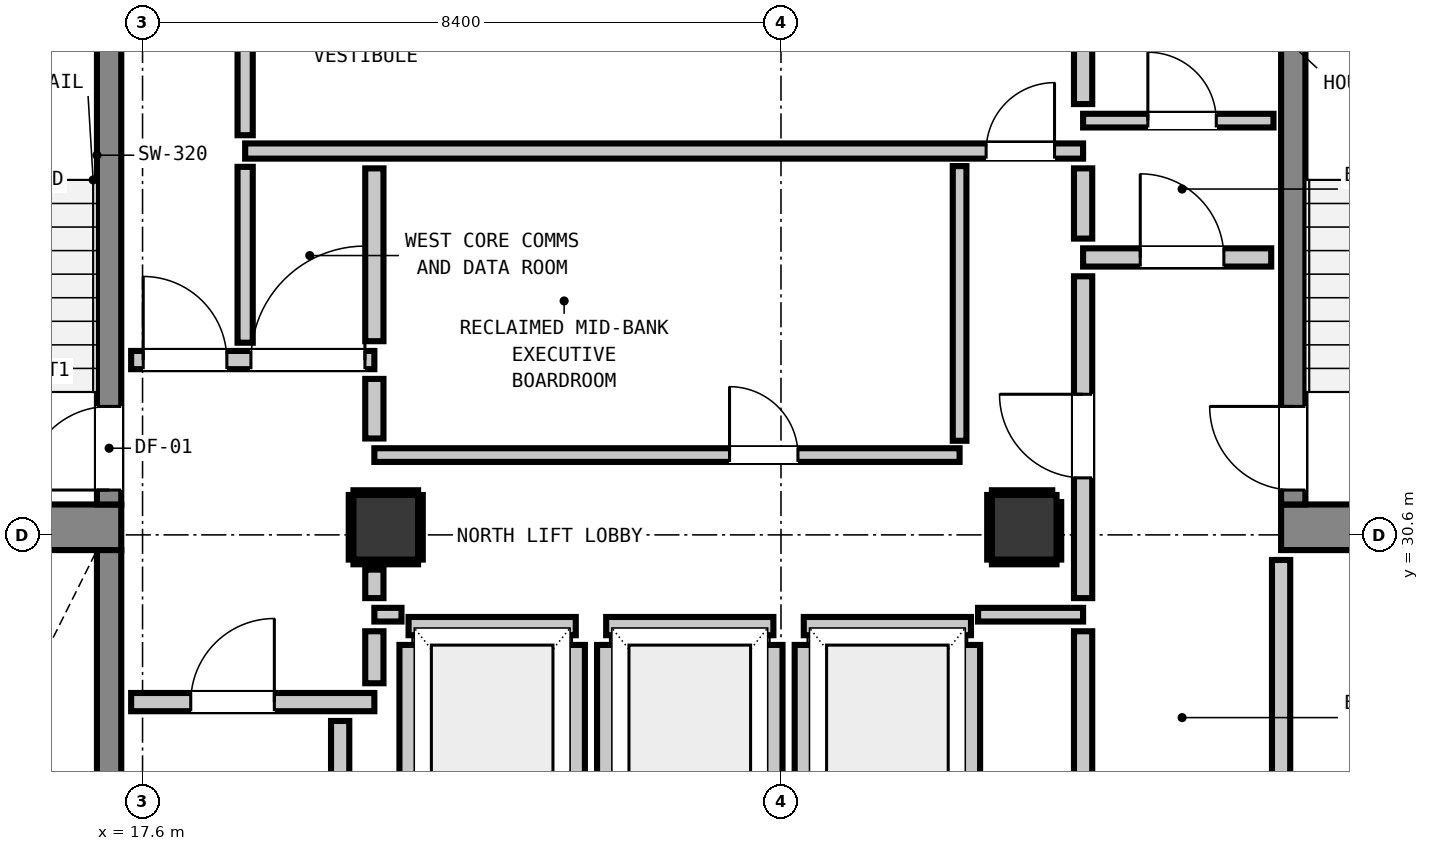
"""IFC4 building model, lengths in metres.
Left out: names, types, materials, properties, quantities, classifications, styles, units other than length and angle.
Written with IfcOpenShell. Run it as: python <this file> out.ifc"""

import sys

from ifc_helpers import new_model, si_unit, direction, frame, frame_2d, origin, origin_2d, place, context, subcontext, project, spatial, rectangle, extrude, element, fill, save


model = new_model("IFC4")
c1 = context("Model", 3, precision=1e-05, world=origin(), true_north=direction((0.0, 1.0)))
c2 = subcontext(c1, "Body", "Model", "MODEL_VIEW")
j1 = project(units=[si_unit("LENGTHUNIT", "METRE"), si_unit("PLANEANGLEUNIT", "RADIAN")], contexts=[c1])
p1 = place(None, origin())
s1 = spatial("IfcSite", under=j1, at=p1, CompositionType="ELEMENT")
p2 = place(p1, origin())
s2 = spatial("IfcBuilding", under=s1, at=p2, CompositionType="ELEMENT")
p3 = place(p2, frame((0.0, 0.0, 193.48)))
s3 = spatial("IfcBuildingStorey", under=s2, at=p3, CompositionType="ELEMENT", Elevation=193.48)
for number, where, z_axis, x_axis in (
    (1, (13.78, 30.7, 0.0), (0.0, 0.0, 1.0), (1.0, 0.0, 0.0)),
    (2, (32.58, 30.7, 0.0), (0.0, 0.0, 1.0), (1.0, 0.0, 0.0)),
):
    element("IfcWall", number, at=place(p3, frame(where, z_axis=z_axis, x_axis=x_axis)), inside=s3, PredefinedType="SHEAR", context=c2, shape_type="SweptSolid", body=[
        extrude(rectangle(XDim=3.54, YDim=0.6, at=frame_2d((1.77, 0.0))), origin(), (0.0, 0.0, 1.0), 3.32),
    ])
p4 = place(p3, frame((17.16, 31.0, 0.0), z_axis=(0.0, 0.0, 1.0), x_axis=(0.0, 1.0, 0.0)))
e3 = element("IfcWall", 3, at=p4, inside=s3, PredefinedType="SHEAR", context=c2, shape_type="SweptSolid", body=[
    extrude(rectangle(XDim=7.8, YDim=0.32, at=frame_2d((3.9, 0.0))), origin(), (0.0, 0.0, 1.0), 3.32),
])
p5 = place(p4, frame((0.19, 0.0, 0.0)))
e4 = element("IfcOpeningElement", 4, at=p5, cuts=e3, PredefinedType="OPENING", context=c2, shape_type="SweptSolid", body=[
    extrude(rectangle(XDim=1.1, YDim=2.15, at=frame_2d((0.55, 1.075))), frame((0.0, 0.17, 0.0), z_axis=(0.0, -1.0, 0.0), x_axis=(1.0, 0.0, 0.0)), (0.0, 0.0, 1.0), 0.34),
])
p6 = place(p3, frame((17.16, 22.4, 0.0), z_axis=(0.0, 0.0, 1.0), x_axis=(0.0, 1.0, 0.0)))
e5 = element("IfcWall", 5, at=p6, inside=s3, PredefinedType="SHEAR", context=c2, shape_type="SweptSolid", body=[
    extrude(rectangle(XDim=8.0, YDim=0.32, at=frame_2d((4.0, 0.0))), origin(), (0.0, 0.0, 1.0), 3.32),
])
p7 = place(p6, frame((0.39, 0.0, 0.0)))
e6 = element("IfcOpeningElement", 6, at=p7, cuts=e5, PredefinedType="OPENING", context=c2, shape_type="SweptSolid", body=[
    extrude(rectangle(XDim=1.1, YDim=2.15, at=frame_2d((0.55, 1.075))), frame((0.0, 0.17, 0.0), z_axis=(0.0, -1.0, 0.0), x_axis=(1.0, 0.0, 0.0)), (0.0, 0.0, 1.0), 0.34),
])
p8 = place(p3, frame((32.74, 31.0, 0.0), z_axis=(0.0, 0.0, 1.0), x_axis=(0.0, 1.0, 0.0)))
e7 = element("IfcWall", 7, at=p8, inside=s3, PredefinedType="SHEAR", context=c2, shape_type="SweptSolid", body=[
    extrude(rectangle(XDim=7.8, YDim=0.32, at=frame_2d((3.9, 0.0))), origin(), (0.0, 0.0, 1.0), 3.32),
])
p9 = place(p8, frame((0.19, 0.0, 0.0)))
e8 = element("IfcOpeningElement", 8, at=p9, cuts=e7, PredefinedType="OPENING", context=c2, shape_type="SweptSolid", body=[
    extrude(rectangle(XDim=1.1, YDim=2.15, at=frame_2d((0.55, 1.075))), frame((0.0, 0.17, 0.0), z_axis=(0.0, -1.0, 0.0), x_axis=(1.0, 0.0, 0.0)), (0.0, 0.0, 1.0), 0.34),
])
for number, where, z_axis, x_axis in (
    (9, (20.8, 30.7, 0.0), (0.0, 0.0, 1.0), (1.0, 0.0, 0.0)),
    (10, (29.2, 30.7, 0.0), (0.0, 0.0, 1.0), (1.0, 0.0, 0.0)),
):
    element("IfcColumn", number, at=place(p3, frame(where, z_axis=z_axis, x_axis=x_axis)), inside=s3, PredefinedType="COLUMN", context=c2, shape_type="SweptSolid", body=[
        extrude(rectangle(XDim=0.85, YDim=0.85, at=origin_2d()), origin(), (0.0, 0.0, 1.0), 3.32),
    ])
p10 = place(p3, frame((21.1, 29.4, 0.0), z_axis=(0.0, 0.0, 1.0), x_axis=(1.0, 0.0, 0.0)))
e11 = element("IfcWall", 11, at=p10, inside=s3, PredefinedType="PARTITIONING", context=c2, shape_type="SweptSolid", body=[
    extrude(rectangle(XDim=2.2, YDim=0.24, at=frame_2d((1.1, 0.0))), origin(), (0.0, 0.0, 1.0), 3.1),
])
p11 = place(p3, frame((21.1, 27.048, 0.0), z_axis=(0.0, 0.0, 1.0), x_axis=(0.0, 1.0, 0.0)))
e12 = element("IfcWall", 12, at=p11, inside=s3, PredefinedType="PARTITIONING", context=c2, shape_type="SweptSolid", body=[
    extrude(rectangle(XDim=2.104, YDim=0.24, at=frame_2d((1.052, 0.0))), origin(), (0.0, 0.0, 1.0), 2.335),
])
p12 = place(p3, frame((23.3, 27.048, 0.0), z_axis=(0.0, 0.0, 1.0), x_axis=(0.0, 1.0, 0.0)))
e13 = element("IfcWall", 13, at=p12, inside=s3, PredefinedType="PARTITIONING", context=c2, shape_type="SweptSolid", body=[
    extrude(rectangle(XDim=2.104, YDim=0.24, at=frame_2d((1.052, 0.0))), origin(), (0.0, 0.0, 1.0), 3.1),
])
p13 = place(p3, frame((23.7, 29.4, 0.0), z_axis=(0.0, 0.0, 1.0), x_axis=(1.0, 0.0, 0.0)))
e14 = element("IfcWall", 14, at=p13, inside=s3, PredefinedType="PARTITIONING", context=c2, shape_type="SweptSolid", body=[
    extrude(rectangle(XDim=2.2, YDim=0.24, at=frame_2d((1.1, 0.0))), origin(), (0.0, 0.0, 1.0), 3.1),
])
for number, where, z_axis, x_axis in (
    (15, (23.7, 27.048, 0.0), (0.0, 0.0, 1.0), (0.0, 1.0, 0.0)),
    (16, (25.9, 27.048, 0.0), (0.0, 0.0, 1.0), (0.0, 1.0, 0.0)),
):
    element("IfcWall", number, at=place(p3, frame(where, z_axis=z_axis, x_axis=x_axis)), inside=s3, PredefinedType="PARTITIONING", context=c2, shape_type="SweptSolid", body=[
        extrude(rectangle(XDim=2.104, YDim=0.24, at=frame_2d((1.052, 0.0))), origin(), (0.0, 0.0, 1.0), 3.1),
    ])
p14 = place(p3, frame((26.3, 29.4, 0.0), z_axis=(0.0, 0.0, 1.0), x_axis=(1.0, 0.0, 0.0)))
e17 = element("IfcWall", 17, at=p14, inside=s3, PredefinedType="PARTITIONING", context=c2, shape_type="SweptSolid", body=[
    extrude(rectangle(XDim=2.2, YDim=0.24, at=frame_2d((1.1, 0.0))), origin(), (0.0, 0.0, 1.0), 3.1),
])
p15 = place(p3, frame((26.3, 27.048, 0.0), z_axis=(0.0, 0.0, 1.0), x_axis=(0.0, 1.0, 0.0)))
e18 = element("IfcWall", 18, at=p15, inside=s3, PredefinedType="PARTITIONING", context=c2, shape_type="SweptSolid", body=[
    extrude(rectangle(XDim=2.104, YDim=0.24, at=frame_2d((1.052, 0.0))), origin(), (0.0, 0.0, 1.0), 3.1),
])
p16 = place(p3, frame((28.5, 27.33, 0.0), z_axis=(0.0, 0.0, 1.0), x_axis=(0.0, 1.0, 0.0)))
e19 = element("IfcWall", 19, at=p16, inside=s3, PredefinedType="PARTITIONING", context=c2, shape_type="SweptSolid", body=[
    extrude(rectangle(XDim=1.822, YDim=0.24, at=frame_2d((0.911, 0.0))), origin(), (0.0, 0.0, 1.0), 3.1),
])
p17 = place(p3, frame((17.45, 28.4, 0.0), z_axis=(0.0, 0.0, 1.0), x_axis=(1.0, 0.0, 0.0)))
e20 = element("IfcWall", 20, at=p17, inside=s3, PredefinedType="PARTITIONING", context=c2, shape_type="SweptSolid", body=[
    extrude(rectangle(XDim=3.2, YDim=0.24, at=frame_2d((1.6, 0.0))), origin(), (0.0, 0.0, 1.0), 3.1),
])
p18 = place(p17, frame((0.784, 0.0, 0.0)))
e21 = element("IfcOpeningElement", 21, at=p18, cuts=e20, PredefinedType="OPENING", context=c2, shape_type="SweptSolid", body=[
    extrude(rectangle(XDim=1.1, YDim=2.15, at=frame_2d((0.55, 1.075))), frame((0.0, 0.13, 0.0), z_axis=(0.0, -1.0, 0.0), x_axis=(1.0, 0.0, 0.0)), (0.0, 0.0, 1.0), 0.26),
])
p19 = place(p3, frame((17.45, 32.9, 0.0), z_axis=(0.0, 0.0, 1.0), x_axis=(1.0, 0.0, 0.0)))
e22 = element("IfcWall", 22, at=p19, inside=s3, PredefinedType="PARTITIONING", context=c2, shape_type="SweptSolid", body=[
    extrude(rectangle(XDim=3.2, YDim=0.24, at=frame_2d((1.6, 0.0))), origin(), (0.0, 0.0, 1.0), 3.1),
])
p20 = place(p19, frame((0.159, 0.0, 0.0)))
e23 = element("IfcOpeningElement", 23, at=p20, cuts=e22, PredefinedType="OPENING", context=c2, shape_type="SweptSolid", body=[
    extrude(rectangle(XDim=1.1, YDim=2.15, at=frame_2d((0.55, 1.075))), frame((0.0, 0.13, 0.0), z_axis=(0.0, -1.0, 0.0), x_axis=(1.0, 0.0, 0.0)), (0.0, 0.0, 1.0), 0.26),
])
p21 = place(p19, frame((1.576, 0.0, 0.0)))
e24 = element("IfcOpeningElement", 24, at=p21, cuts=e22, PredefinedType="OPENING", context=c2, shape_type="SweptSolid", body=[
    extrude(rectangle(XDim=1.5, YDim=2.15, at=frame_2d((0.75, 1.075))), frame((0.0, 0.13, 0.0), z_axis=(0.0, -1.0, 0.0), x_axis=(1.0, 0.0, 0.0)), (0.0, 0.0, 1.0), 0.26),
])
p22 = place(p3, frame((29.975, 34.25, 0.0), z_axis=(0.0, 0.0, 1.0), x_axis=(1.0, 0.0, 0.0)))
e25 = element("IfcWall", 25, at=p22, inside=s3, PredefinedType="PARTITIONING", context=c2, shape_type="SweptSolid", body=[
    extrude(rectangle(XDim=2.475, YDim=0.24, at=frame_2d((1.237, 0.0))), origin(), (0.0, 0.0, 1.0), 3.1),
])
p23 = place(p22, frame((0.752, 0.0, 0.0)))
e26 = element("IfcOpeningElement", 26, at=p23, cuts=e25, PredefinedType="OPENING", context=c2, shape_type="SweptSolid", body=[
    extrude(rectangle(XDim=1.1, YDim=2.15, at=frame_2d((0.55, 1.075))), frame((0.0, 0.13, 0.0), z_axis=(0.0, -1.0, 0.0), x_axis=(1.0, 0.0, 0.0)), (0.0, 0.0, 1.0), 0.26),
])
p24 = place(p3, frame((18.95, 35.65, 0.0), z_axis=(0.0, 0.0, 1.0), x_axis=(1.0, 0.0, 0.0)))
e27 = element("IfcWall", 27, at=p24, inside=s3, PredefinedType="PARTITIONING", context=c2, shape_type="SweptSolid", body=[
    extrude(rectangle(XDim=11.025, YDim=0.2, at=frame_2d((5.513, 0.0))), origin(), (0.0, 0.0, 1.0), 3.1),
])
p25 = place(p24, frame((9.749, 0.0, 0.0)))
e28 = element("IfcOpeningElement", 28, at=p25, cuts=e27, PredefinedType="OPENING", context=c2, shape_type="SweptSolid", body=[
    extrude(rectangle(XDim=0.9, YDim=2.1, at=frame_2d((0.45, 1.05))), frame((0.0, 0.11, 0.0), z_axis=(0.0, -1.0, 0.0), x_axis=(1.0, 0.0, 0.0)), (0.0, 0.0, 1.0), 0.22),
])
p26 = place(p3, frame((20.65, 29.55, 0.0), z_axis=(0.0, 0.0, 1.0), x_axis=(1.0, 0.0, 0.0)))
e29 = element("IfcWall", 29, at=p26, inside=s3, PredefinedType="PARTITIONING", context=c2, shape_type="SweptSolid", body=[
    extrude(rectangle(XDim=0.357, YDim=0.18, at=frame_2d((0.179, 0.0))), origin(), (0.0, 0.0, 1.0), 3.1),
])
p27 = place(p3, frame((28.593, 29.55, 0.0), z_axis=(0.0, 0.0, 1.0), x_axis=(1.0, 0.0, 0.0)))
e30 = element("IfcWall", 30, at=p27, inside=s3, PredefinedType="PARTITIONING", context=c2, shape_type="SweptSolid", body=[
    extrude(rectangle(XDim=1.382, YDim=0.18, at=frame_2d((0.691, 0.0))), origin(), (0.0, 0.0, 1.0), 3.1),
])
p28 = place(p3, frame((20.65, 31.65, 0.0), z_axis=(0.0, 0.0, 1.0), x_axis=(1.0, 0.0, 0.0)))
e31 = element("IfcWall", 31, at=p28, inside=s3, PredefinedType="PARTITIONING", context=c2, shape_type="SweptSolid", body=[
    extrude(rectangle(XDim=7.7, YDim=0.18, at=frame_2d((3.85, 0.0))), origin(), (0.0, 0.0, 1.0), 3.1),
])
p29 = place(p28, frame((4.673, 0.0, 0.0)))
e32 = element("IfcOpeningElement", 32, at=p29, cuts=e31, PredefinedType="OPENING", context=c2, shape_type="SweptSolid", body=[
    extrude(rectangle(XDim=0.9, YDim=2.1, at=frame_2d((0.45, 1.05))), frame((0.0, 0.1, 0.0), z_axis=(0.0, -1.0, 0.0), x_axis=(1.0, 0.0, 0.0)), (0.0, 0.0, 1.0), 0.2),
])
p30 = place(p3, frame((29.975, 36.05, 0.0), z_axis=(0.0, 0.0, 1.0), x_axis=(1.0, 0.0, 0.0)))
e33 = element("IfcWall", 33, at=p30, inside=s3, PredefinedType="PARTITIONING", context=c2, shape_type="SweptSolid", body=[
    extrude(rectangle(XDim=2.505, YDim=0.18, at=frame_2d((1.252, 0.0))), origin(), (0.0, 0.0, 1.0), 3.1),
])
p31 = place(p30, frame((0.852, 0.0, 0.0)))
e34 = element("IfcOpeningElement", 34, at=p31, cuts=e33, PredefinedType="OPENING", context=c2, shape_type="SweptSolid", body=[
    extrude(rectangle(XDim=0.9, YDim=2.1, at=frame_2d((0.45, 1.05))), frame((0.0, 0.1, 0.0), z_axis=(0.0, -1.0, 0.0), x_axis=(1.0, 0.0, 0.0)), (0.0, 0.0, 1.0), 0.2),
])
p32 = place(p3, frame((20.2, 21.398, 0.0), z_axis=(0.0, 0.0, 1.0), x_axis=(0.0, 1.0, 0.0)))
e35 = element("IfcWall", 35, at=p32, inside=s3, PredefinedType="PARTITIONING", context=c2, shape_type="SweptSolid", body=[
    extrude(rectangle(XDim=6.754, YDim=0.24, at=frame_2d((3.377, 0.0))), origin(), (0.0, 0.0, 1.0), 3.1),
])
p33 = place(p3, frame((20.65, 28.648, 0.0), z_axis=(0.0, 0.0, 1.0), x_axis=(0.0, 1.0, 0.0)))
e36 = element("IfcWall", 36, at=p33, inside=s3, PredefinedType="PARTITIONING", context=c2, shape_type="SweptSolid", body=[
    extrude(rectangle(XDim=0.684, YDim=0.24, at=frame_2d((0.342, 0.0))), origin(), (0.0, 0.0, 1.0), 2.335),
])
p34 = place(p3, frame((20.65, 29.768, 0.0), z_axis=(0.0, 0.0, 1.0), x_axis=(0.0, 1.0, 0.0)))
e37 = element("IfcWall", 37, at=p34, inside=s3, PredefinedType="PARTITIONING", context=c2, shape_type="SweptSolid", body=[
    extrude(rectangle(XDim=0.375, YDim=0.24, at=frame_2d((0.188, 0.0))), origin(), (0.0, 0.0, 1.0), 2.335),
])
p35 = place(p3, frame((20.65, 31.868, 0.0), z_axis=(0.0, 0.0, 1.0), x_axis=(0.0, 1.0, 0.0)))
e38 = element("IfcWall", 38, at=p35, inside=s3, PredefinedType="PARTITIONING", context=c2, shape_type="SweptSolid", body=[
    extrude(rectangle(XDim=0.784, YDim=0.24, at=frame_2d((0.392, 0.0))), origin(), (0.0, 0.0, 1.0), 2.335),
])
p36 = place(p3, frame((20.65, 33.148, 0.0), z_axis=(0.0, 0.0, 1.0), x_axis=(0.0, 1.0, 0.0)))
e39 = element("IfcWall", 39, at=p36, inside=s3, PredefinedType="PARTITIONING", context=c2, shape_type="SweptSolid", body=[
    extrude(rectangle(XDim=2.274, YDim=0.24, at=frame_2d((1.137, 0.0))), origin(), (0.0, 0.0, 1.0), 2.335),
])
p37 = place(p3, frame((29.975, 25.648, 0.0), z_axis=(0.0, 0.0, 1.0), x_axis=(0.0, 1.0, 0.0)))
e40 = element("IfcWall", 40, at=p37, inside=s3, PredefinedType="PARTITIONING", context=c2, shape_type="SweptSolid", body=[
    extrude(rectangle(XDim=3.684, YDim=0.24, at=frame_2d((1.842, 0.0))), origin(), (0.0, 0.0, 1.0), 3.1),
])
p38 = place(p3, frame((29.975, 29.768, 0.0), z_axis=(0.0, 0.0, 1.0), x_axis=(0.0, 1.0, 0.0)))
e41 = element("IfcWall", 41, at=p38, inside=s3, PredefinedType="PARTITIONING", context=c2, shape_type="SweptSolid", body=[
    extrude(rectangle(XDim=4.234, YDim=0.24, at=frame_2d((2.117, 0.0))), origin(), (0.0, 0.0, 1.0), 3.1),
])
p39 = place(p38, frame((1.582, 0.0, 0.0)))
e42 = element("IfcOpeningElement", 42, at=p39, cuts=e41, PredefinedType="OPENING", context=c2, shape_type="SweptSolid", body=[
    extrude(rectangle(XDim=1.1, YDim=2.15, at=frame_2d((0.55, 1.075))), frame((0.0, 0.13, 0.0), z_axis=(0.0, -1.0, 0.0), x_axis=(1.0, 0.0, 0.0)), (0.0, 0.0, 1.0), 0.26),
])
p40 = place(p3, frame((29.975, 34.498, 0.0), z_axis=(0.0, 0.0, 1.0), x_axis=(0.0, 1.0, 0.0)))
e43 = element("IfcWall", 43, at=p40, inside=s3, PredefinedType="PARTITIONING", context=c2, shape_type="SweptSolid", body=[
    extrude(rectangle(XDim=0.924, YDim=0.24, at=frame_2d((0.462, 0.0))), origin(), (0.0, 0.0, 1.0), 3.1),
])
p41 = place(p3, frame((29.975, 36.268, 0.0), z_axis=(0.0, 0.0, 1.0), x_axis=(0.0, 1.0, 0.0)))
e44 = element("IfcWall", 44, at=p41, inside=s3, PredefinedType="PARTITIONING", context=c2, shape_type="SweptSolid", body=[
    extrude(rectangle(XDim=2.294, YDim=0.24, at=frame_2d((1.147, 0.0))), origin(), (0.0, 0.0, 1.0), 3.1),
])
p42 = place(p3, frame((32.58, 25.648, 0.0), z_axis=(0.0, 0.0, 1.0), x_axis=(0.0, 1.0, 0.0)))
e45 = element("IfcWall", 45, at=p42, inside=s3, PredefinedType="PARTITIONING", context=c2, shape_type="SweptSolid", body=[
    extrude(rectangle(XDim=4.622, YDim=0.24, at=frame_2d((2.311, 0.0))), origin(), (0.0, 0.0, 1.0), 3.1),
])
p43 = place(p3, frame((18.95, 33.128, 0.0), z_axis=(0.0, 0.0, 1.0), x_axis=(0.0, 1.0, 0.0)))
e46 = element("IfcWall", 46, at=p43, inside=s3, PredefinedType="PARTITIONING", context=c2, shape_type="SweptSolid", body=[
    extrude(rectangle(XDim=2.314, YDim=0.2, at=frame_2d((1.157, 0.0))), origin(), (0.0, 0.0, 1.0), 3.1),
])
p44 = place(p3, frame((18.95, 35.858, 0.0), z_axis=(0.0, 0.0, 1.0), x_axis=(0.0, 1.0, 0.0)))
e47 = element("IfcWall", 47, at=p44, inside=s3, PredefinedType="PARTITIONING", context=c2, shape_type="SweptSolid", body=[
    extrude(rectangle(XDim=2.724, YDim=0.2, at=frame_2d((1.362, 0.0))), origin(), (0.0, 0.0, 1.0), 3.1),
])
p45 = place(p3, frame((28.35, 31.838, 0.0), z_axis=(0.0, 0.0, 1.0), x_axis=(0.0, 1.0, 0.0)))
e48 = element("IfcWall", 48, at=p45, inside=s3, PredefinedType="PARTITIONING", context=c2, shape_type="SweptSolid", body=[
    extrude(rectangle(XDim=3.614, YDim=0.18, at=frame_2d((1.807, 0.0))), origin(), (0.0, 0.0, 1.0), 3.1),
])
for number, where, z_axis, x_axis in (
    (49, (20.375, 30.243, 0.0), (0.0, 0.0, 1.0), (1.0, 0.0, 0.0)),
    (50, (20.375, 31.157, 0.0), (0.0, 0.0, 1.0), (1.0, 0.0, 0.0)),
    (51, (20.343, 30.275, 0.0), (0.0, 0.0, 1.0), (0.0, 1.0, 0.0)),
    (52, (21.257, 30.275, 0.0), (0.0, 0.0, 1.0), (0.0, 1.0, 0.0)),
    (53, (28.775, 30.243, 0.0), (0.0, 0.0, 1.0), (1.0, 0.0, 0.0)),
):
    element("IfcWall", number, at=place(p3, frame(where, z_axis=z_axis, x_axis=x_axis)), inside=s3, PredefinedType="PARTITIONING", context=c2, shape_type="SweptSolid", body=[
        extrude(rectangle(XDim=0.85, YDim=0.06, at=frame_2d((0.425, 0.0))), origin(), (0.0, 0.0, 1.0), 1.45),
    ])
p46 = place(p3, frame((28.775, 31.157, 0.0), z_axis=(0.0, 0.0, 1.0), x_axis=(1.0, 0.0, 0.0)))
e54 = element("IfcWall", 54, at=p46, inside=s3, PredefinedType="PARTITIONING", context=c2, shape_type="SweptSolid", body=[
    extrude(rectangle(XDim=0.794, YDim=0.06, at=frame_2d((0.397, 0.0))), origin(), (0.0, 0.0, 1.0), 1.45),
])
p47 = place(p3, frame((28.743, 30.275, 0.0), z_axis=(0.0, 0.0, 1.0), x_axis=(0.0, 1.0, 0.0)))
e55 = element("IfcWall", 55, at=p47, inside=s3, PredefinedType="PARTITIONING", context=c2, shape_type="SweptSolid", body=[
    extrude(rectangle(XDim=0.85, YDim=0.06, at=frame_2d((0.425, 0.0))), origin(), (0.0, 0.0, 1.0), 1.45),
])
p48 = place(p3, frame((29.657, 30.275, 0.0), z_axis=(0.0, 0.0, 1.0), x_axis=(0.0, 1.0, 0.0)))
e56 = element("IfcWall", 56, at=p48, inside=s3, PredefinedType="PARTITIONING", context=c2, shape_type="SweptSolid", body=[
    extrude(rectangle(XDim=0.757, YDim=0.06, at=frame_2d((0.378, 0.0))), origin(), (0.0, 0.0, 1.0), 1.45),
])
p49 = place(p5, origin())
e57 = element("IfcDoor", 57, at=p49, inside=s3, OperationType="SINGLE_SWING_LEFT", PredefinedType="DOOR", context=c2, shape_type="SweptSolid", body=[
    extrude(rectangle(XDim=1.1, YDim=2.15, at=frame_2d((0.55, 1.075))), frame((0.0, 0.025, 0.0), z_axis=(0.0, -1.0, 0.0), x_axis=(1.0, 0.0, 0.0)), (0.0, 0.0, 1.0), 0.05),
])
fill(e4, e57)
p50 = place(p9, origin())
e58 = element("IfcDoor", 58, at=p50, inside=s3, OperationType="SINGLE_SWING_RIGHT", PredefinedType="DOOR", context=c2, shape_type="SweptSolid", body=[
    extrude(rectangle(XDim=1.1, YDim=2.15, at=frame_2d((0.55, 1.075))), frame((0.0, 0.025, 0.0), z_axis=(0.0, -1.0, 0.0), x_axis=(1.0, 0.0, 0.0)), (0.0, 0.0, 1.0), 0.05),
])
fill(e8, e58)
p51 = place(p18, origin())
e59 = element("IfcDoor", 59, at=p51, inside=s3, OperationType="SINGLE_SWING_RIGHT", PredefinedType="DOOR", context=c2, shape_type="SweptSolid", body=[
    extrude(rectangle(XDim=1.1, YDim=2.15, at=frame_2d((0.55, 1.075))), frame((0.0, 0.025, 0.0), z_axis=(0.0, -1.0, 0.0), x_axis=(1.0, 0.0, 0.0)), (0.0, 0.0, 1.0), 0.05),
])
fill(e21, e59)
p52 = place(p20, origin())
e60 = element("IfcDoor", 60, at=p52, inside=s3, OperationType="SINGLE_SWING_LEFT", PredefinedType="DOOR", context=c2, shape_type="SweptSolid", body=[
    extrude(rectangle(XDim=1.1, YDim=2.15, at=frame_2d((0.55, 1.075))), frame((0.0, 0.025, 0.0), z_axis=(0.0, -1.0, 0.0), x_axis=(1.0, 0.0, 0.0)), (0.0, 0.0, 1.0), 0.05),
])
fill(e23, e60)
p53 = place(p39, origin())
e61 = element("IfcDoor", 61, at=p53, inside=s3, OperationType="SINGLE_SWING_RIGHT", PredefinedType="DOOR", context=c2, shape_type="SweptSolid", body=[
    extrude(rectangle(XDim=1.1, YDim=2.15, at=frame_2d((0.55, 1.075))), frame((0.0, 0.025, 0.0), z_axis=(0.0, -1.0, 0.0), x_axis=(1.0, 0.0, 0.0)), (0.0, 0.0, 1.0), 0.05),
])
fill(e42, e61)
p54 = place(p23, origin())
e62 = element("IfcDoor", 62, at=p54, inside=s3, OperationType="SINGLE_SWING_LEFT", PredefinedType="DOOR", context=c2, shape_type="SweptSolid", body=[
    extrude(rectangle(XDim=1.1, YDim=2.15, at=frame_2d((0.55, 1.075))), frame((0.0, 0.025, 0.0), z_axis=(0.0, -1.0, 0.0), x_axis=(1.0, 0.0, 0.0)), (0.0, 0.0, 1.0), 0.05),
])
fill(e26, e62)
p55 = place(p21, origin())
e63 = element("IfcDoor", 63, at=p55, inside=s3, OperationType="SINGLE_SWING_RIGHT", PredefinedType="DOOR", context=c2, shape_type="SweptSolid", body=[
    extrude(rectangle(XDim=1.5, YDim=2.15, at=frame_2d((0.75, 1.075))), frame((0.0, 0.025, 0.0), z_axis=(0.0, -1.0, 0.0), x_axis=(1.0, 0.0, 0.0)), (0.0, 0.0, 1.0), 0.05),
])
fill(e24, e63)
p56 = place(p31, origin())
e64 = element("IfcDoor", 64, at=p56, inside=s3, OperationType="SINGLE_SWING_LEFT", PredefinedType="DOOR", context=c2, shape_type="SweptSolid", body=[
    extrude(rectangle(XDim=0.9, YDim=2.1, at=frame_2d((0.45, 1.05))), frame((0.0, 0.025, 0.0), z_axis=(0.0, -1.0, 0.0), x_axis=(1.0, 0.0, 0.0)), (0.0, 0.0, 1.0), 0.05),
])
fill(e34, e64)
p57 = place(p25, origin())
e65 = element("IfcDoor", 65, at=p57, inside=s3, OperationType="SINGLE_SWING_RIGHT", PredefinedType="DOOR", context=c2, shape_type="SweptSolid", body=[
    extrude(rectangle(XDim=0.9, YDim=2.1, at=frame_2d((0.45, 1.05))), frame((0.0, 0.025, 0.0), z_axis=(0.0, -1.0, 0.0), x_axis=(1.0, 0.0, 0.0)), (0.0, 0.0, 1.0), 0.05),
])
fill(e28, e65)
p58 = place(p29, origin())
e66 = element("IfcDoor", 66, at=p58, inside=s3, OperationType="SINGLE_SWING_LEFT", PredefinedType="DOOR", context=c2, shape_type="SweptSolid", body=[
    extrude(rectangle(XDim=0.9, YDim=2.1, at=frame_2d((0.45, 1.05))), frame((0.0, 0.025, 0.0), z_axis=(0.0, -1.0, 0.0), x_axis=(1.0, 0.0, 0.0)), (0.0, 0.0, 1.0), 0.05),
])
fill(e32, e66)
save(model, sys.argv[1])
